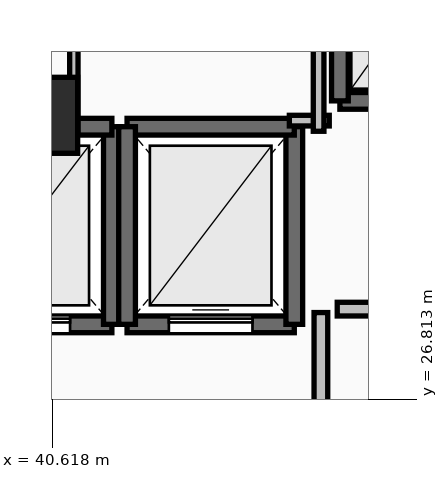
"""IFC4 building model, lengths in metres.
Left out: names, types, materials, properties, quantities, classifications, styles, units other than length and angle.
Written with IfcOpenShell. Run it as: python <this file> out.ifc"""

import sys

from ifc_helpers import new_model, si_unit, direction, frame, frame_2d, origin, origin_2d, place, context, subcontext, project, spatial, rectangle, extrude, element, fill, save


model = new_model("IFC4")
c1 = context("Model", 3, precision=1e-05, world=origin(), true_north=direction((0.0, 1.0)))
c2 = subcontext(c1, "Body", "Model", "MODEL_VIEW")
j1 = project(units=[si_unit("LENGTHUNIT", "METRE"), si_unit("PLANEANGLEUNIT", "RADIAN")], contexts=[c1])
p1 = place(None, origin())
s1 = spatial("IfcSite", under=j1, at=p1, CompositionType="ELEMENT")
p2 = place(p1, origin())
s2 = spatial("IfcBuilding", under=s1, at=p2, CompositionType="ELEMENT")
p3 = place(p2, frame((0.0, 0.0, 229.75)))
s3 = spatial("IfcBuildingStorey", under=s2, at=p3, CompositionType="ELEMENT", Elevation=229.75)
p4 = place(p3, frame((40.6, 30.55, 0.0), z_axis=(0.0, 0.0, 1.0), x_axis=(1.0, 0.0, 0.0)))
e1 = element("IfcColumn", 1, at=p4, inside=s3, PredefinedType="PILASTER", context=c2, shape_type="SweptSolid", body=[
    extrude(rectangle(XDim=0.7, YDim=1.0, at=origin_2d()), origin(), (0.0, 0.0, 1.0), 4.5),
])
p5 = place(p3, frame((39.2, 27.8, 0.0), z_axis=(0.0, 0.0, 1.0), x_axis=(1.0, 0.0, 0.0)))
e2 = element("IfcWall", 2, at=p5, inside=s3, PredefinedType="SOLIDWALL", context=c2, shape_type="SweptSolid", body=[
    extrude(rectangle(XDim=2.2, YDim=0.22, at=frame_2d((1.1, 0.0))), origin(), (0.0, 0.0, 1.0), 4.24),
])
p6 = place(p5, frame((0.55, 0.0, 0.0)))
e3 = element("IfcOpeningElement", 3, at=p6, cuts=e2, PredefinedType="OPENING", context=c2, shape_type="SweptSolid", body=[
    extrude(rectangle(XDim=1.1, YDim=2.2, at=frame_2d((0.55, 1.1))), frame((0.0, 0.125, 0.0), z_axis=(0.0, -1.0, 0.0), x_axis=(1.0, 0.0, 0.0)), (0.0, 0.0, 1.0), 0.25),
])
p7 = place(p3, frame((41.4, 27.8, 0.0), z_axis=(0.0, 0.0, 1.0), x_axis=(0.0, 1.0, 0.0)))
e4 = element("IfcWall", 4, at=p7, inside=s3, PredefinedType="SOLIDWALL", context=c2, shape_type="SweptSolid", body=[
    extrude(rectangle(XDim=2.6, YDim=0.22, at=frame_2d((1.3, 0.0))), origin(), (0.0, 0.0, 1.0), 4.24),
])
p8 = place(p3, frame((41.4, 30.4, 0.0), z_axis=(0.0, 0.0, 1.0), x_axis=(-1.0, 0.0, 0.0)))
e5 = element("IfcWall", 5, at=p8, inside=s3, PredefinedType="SOLIDWALL", context=c2, shape_type="SweptSolid", body=[
    extrude(rectangle(XDim=2.2, YDim=0.22, at=frame_2d((1.1, 0.0))), origin(), (0.0, 0.0, 1.0), 4.24),
])
p9 = place(p3, frame((41.6, 27.8, 0.0), z_axis=(0.0, 0.0, 1.0), x_axis=(1.0, 0.0, 0.0)))
e6 = element("IfcWall", 6, at=p9, inside=s3, PredefinedType="SOLIDWALL", context=c2, shape_type="SweptSolid", body=[
    extrude(rectangle(XDim=2.2, YDim=0.22, at=frame_2d((1.1, 0.0))), origin(), (0.0, 0.0, 1.0), 4.24),
])
p10 = place(p9, frame((0.55, 0.0, 0.0)))
e7 = element("IfcOpeningElement", 7, at=p10, cuts=e6, PredefinedType="OPENING", context=c2, shape_type="SweptSolid", body=[
    extrude(rectangle(XDim=1.1, YDim=2.2, at=frame_2d((0.55, 1.1))), frame((0.0, 0.125, 0.0), z_axis=(0.0, -1.0, 0.0), x_axis=(1.0, 0.0, 0.0)), (0.0, 0.0, 1.0), 0.25),
])
p11 = place(p3, frame((43.8, 27.8, 0.0), z_axis=(0.0, 0.0, 1.0), x_axis=(0.0, 1.0, 0.0)))
e8 = element("IfcWall", 8, at=p11, inside=s3, PredefinedType="SOLIDWALL", context=c2, shape_type="SweptSolid", body=[
    extrude(rectangle(XDim=2.6, YDim=0.22, at=frame_2d((1.3, 0.0))), origin(), (0.0, 0.0, 1.0), 4.24),
])
p12 = place(p3, frame((43.8, 30.4, 0.0), z_axis=(0.0, 0.0, 1.0), x_axis=(-1.0, 0.0, 0.0)))
e9 = element("IfcWall", 9, at=p12, inside=s3, PredefinedType="SOLIDWALL", context=c2, shape_type="SweptSolid", body=[
    extrude(rectangle(XDim=2.2, YDim=0.22, at=frame_2d((1.1, 0.0))), origin(), (0.0, 0.0, 1.0), 4.24),
])
p13 = place(p3, frame((41.6, 30.4, 0.0), z_axis=(0.0, 0.0, 1.0), x_axis=(0.0, -1.0, 0.0)))
e10 = element("IfcWall", 10, at=p13, inside=s3, PredefinedType="SOLIDWALL", context=c2, shape_type="SweptSolid", body=[
    extrude(rectangle(XDim=2.6, YDim=0.22, at=frame_2d((1.3, 0.0))), origin(), (0.0, 0.0, 1.0), 4.24),
])
p14 = place(p3, frame((44.4, 30.74, 0.0), z_axis=(0.0, 0.0, 1.0), x_axis=(1.0, 0.0, 0.0)))
e11 = element("IfcWall", 11, at=p14, inside=s3, PredefinedType="SOLIDWALL", context=c2, shape_type="SweptSolid", body=[
    extrude(rectangle(XDim=1.8, YDim=0.22, at=frame_2d((0.9, 0.0))), origin(), (0.0, 0.0, 1.0), 4.24),
])
p15 = place(p3, frame((44.4, 33.16, 0.0), z_axis=(0.0, 0.0, 1.0), x_axis=(0.0, -1.0, 0.0)))
e12 = element("IfcWall", 12, at=p15, inside=s3, PredefinedType="SOLIDWALL", context=c2, shape_type="SweptSolid", body=[
    extrude(rectangle(XDim=2.42, YDim=0.22, at=frame_2d((1.21, 0.0))), origin(), (0.0, 0.0, 1.0), 4.24),
])
p16 = place(p3, frame((44.15, 27.955, 0.0), z_axis=(0.0, 0.0, 1.0), x_axis=(0.0, -1.0, 0.0)))
e13 = element("IfcWall", 13, at=p16, inside=s3, PredefinedType="PARTITIONING", context=c2, shape_type="SweptSolid", body=[
    extrude(rectangle(XDim=3.91, YDim=0.18, at=frame_2d((1.955, 0.0))), origin(), (0.0, 0.0, 1.0), 4.24),
])
p17 = place(p16, frame((1.355, 0.0, 0.0)))
e14 = element("IfcOpeningElement", 14, at=p17, cuts=e13, PredefinedType="OPENING", context=c2, shape_type="SweptSolid", body=[
    extrude(rectangle(XDim=1.2, YDim=2.15, at=frame_2d((0.6, 1.075))), frame((0.0, 0.105, 0.0), z_axis=(0.0, -1.0, 0.0), x_axis=(1.0, 0.0, 0.0)), (0.0, 0.0, 1.0), 0.21),
])
p18 = place(p3, frame((40.9, 30.34, 0.0), z_axis=(0.0, 0.0, 1.0), x_axis=(0.0, 1.0, 0.0)))
e15 = element("IfcWall", 15, at=p18, inside=s3, PredefinedType="PARTITIONING", context=c2, shape_type="SweptSolid", body=[
    extrude(rectangle(XDim=3.56, YDim=0.11, at=frame_2d((1.78, 0.0))), origin(), (0.0, 0.0, 1.0), 4.24),
])
p19 = place(p3, frame((45.28, 28.0, 0.0), z_axis=(0.0, 0.0, 1.0), x_axis=(-1.0, 0.0, 0.0)))
e16 = element("IfcWall", 16, at=p19, inside=s3, PredefinedType="PARTITIONING", context=c2, shape_type="SweptSolid", body=[
    extrude(rectangle(XDim=0.915, YDim=0.18, at=frame_2d((0.458, 0.0))), origin(), (0.0, 0.0, 1.0), 4.24),
])
p20 = place(p3, frame((43.735, 30.48, 0.0), z_axis=(0.0, 0.0, 1.0), x_axis=(1.0, 0.0, 0.0)))
e17 = element("IfcWall", 17, at=p20, inside=s3, PredefinedType="PARTITIONING", context=c2, shape_type="SweptSolid", body=[
    extrude(rectangle(XDim=0.525, YDim=0.14, at=frame_2d((0.262, 0.0))), origin(), (0.0, 0.0, 1.0), 4.24),
])
p21 = place(p3, frame((44.12, 30.34, 0.0), z_axis=(0.0, 0.0, 1.0), x_axis=(0.0, 1.0, 0.0)))
e18 = element("IfcWall", 18, at=p21, inside=s3, PredefinedType="PARTITIONING", context=c2, shape_type="SweptSolid", body=[
    extrude(rectangle(XDim=2.66, YDim=0.14, at=frame_2d((1.33, 0.0))), origin(), (0.0, 0.0, 1.0), 4.24),
])
p22 = place(p6, origin())
e19 = element("IfcDoor", 19, at=p22, inside=s3, OperationType="SLIDING_TO_LEFT", PredefinedType="DOOR", context=c2, shape_type="SweptSolid", body=[
    extrude(rectangle(XDim=1.1, YDim=2.2, at=frame_2d((0.55, 1.1))), frame((0.0, 0.025, 0.0), z_axis=(0.0, -1.0, 0.0), x_axis=(1.0, 0.0, 0.0)), (0.0, 0.0, 1.0), 0.05),
])
fill(e3, e19)
p23 = place(p10, origin())
e20 = element("IfcDoor", 20, at=p23, inside=s3, OperationType="SLIDING_TO_LEFT", PredefinedType="DOOR", context=c2, shape_type="SweptSolid", body=[
    extrude(rectangle(XDim=1.1, YDim=2.2, at=frame_2d((0.55, 1.1))), frame((0.0, 0.025, 0.0), z_axis=(0.0, -1.0, 0.0), x_axis=(1.0, 0.0, 0.0)), (0.0, 0.0, 1.0), 0.05),
])
fill(e7, e20)
save(model, sys.argv[1])
